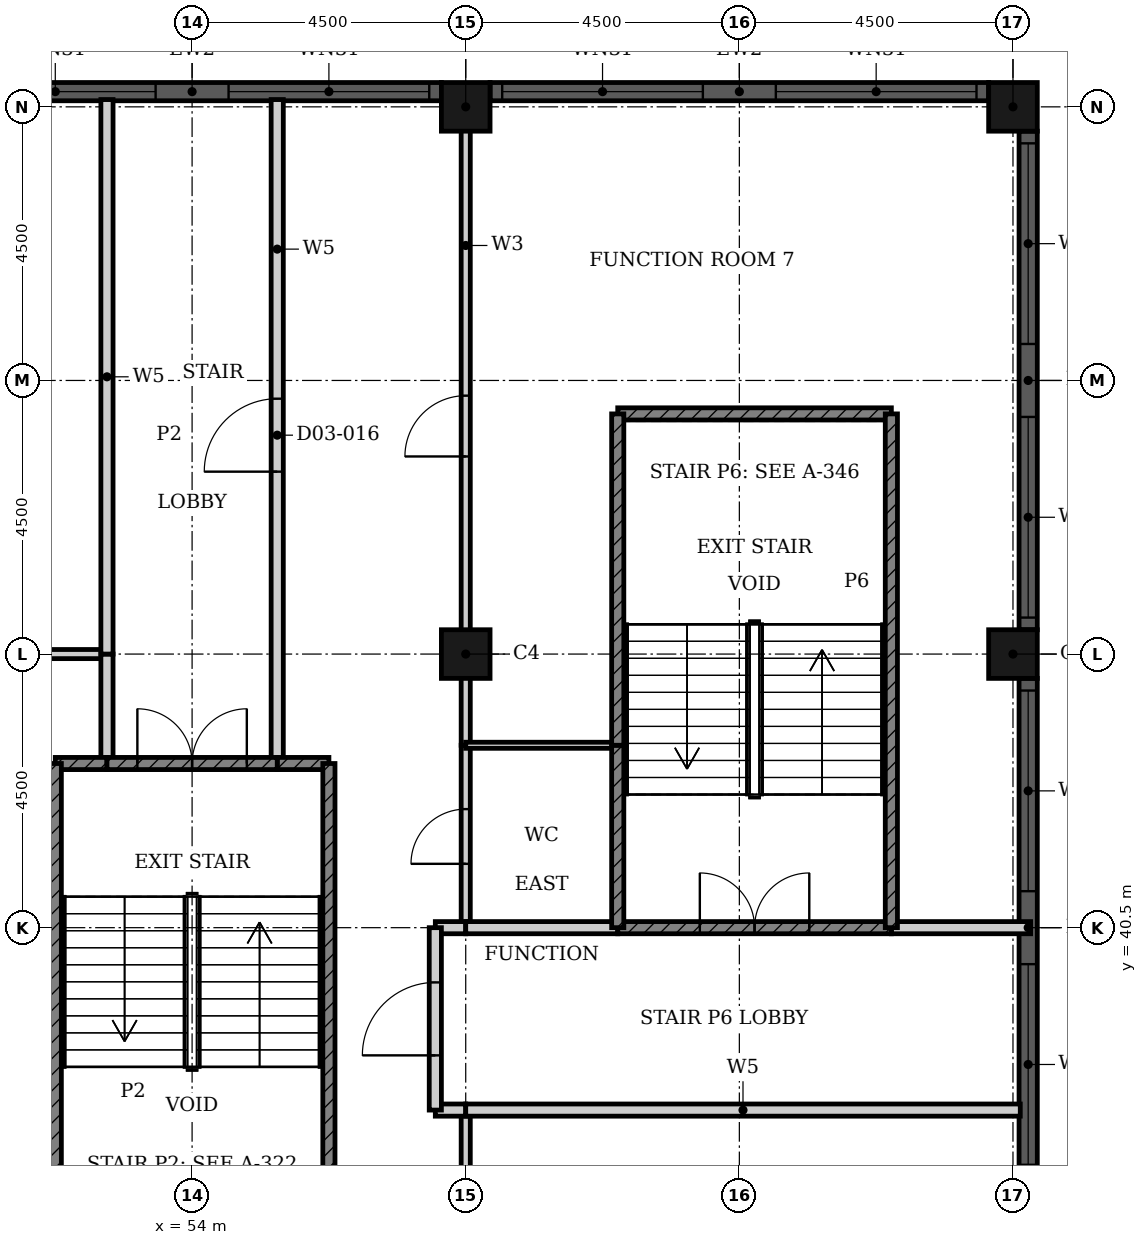
"""IFC4 building model, lengths in metres.
Left out: names, types, materials, properties, quantities, classifications, styles, units other than length and angle.
Written with IfcOpenShell. Run it as: python <this file> out.ifc"""

import sys

from ifc_helpers import new_model, si_unit, direction, frame, frame_2d, origin, origin_2d, place, context, subcontext, project, spatial, rectangle, hollow_rectangle, extrude, element, fill, save


model = new_model("IFC4")
c1 = context("Model", 3, precision=1e-05, world=origin(), true_north=direction((0.0, 1.0)))
c2 = subcontext(c1, "Body", "Model", "MODEL_VIEW")
j1 = project(units=[si_unit("LENGTHUNIT", "METRE"), si_unit("PLANEANGLEUNIT", "RADIAN")], contexts=[c1])
p1 = place(None, origin())
s1 = spatial("IfcSite", under=j1, at=p1, CompositionType="ELEMENT")
p2 = place(p1, origin())
s2 = spatial("IfcBuilding", under=s1, at=p2, CompositionType="ELEMENT")
p3 = place(p2, frame((0.0, 0.0, 17.4)))
s3 = spatial("IfcBuildingStorey", under=s2, at=p3, CompositionType="ELEMENT", Elevation=17.4)
for number, where, z_axis, x_axis in (
    (1, (58.5, 54.0, 0.0), (0.0, 0.0, 1.0), (1.0, 0.0, 0.0)),
    (2, (67.5, 45.0, 0.0), (0.0, 0.0, 1.0), (1.0, 0.0, 0.0)),
    (3, (67.5, 54.0, 0.0), (0.0, 0.0, 1.0), (1.0, 0.0, 0.0)),
    (4, (58.5, 45.0, 0.0), (0.0, 0.0, 1.0), (1.0, 0.0, 0.0)),
):
    element("IfcColumn", number, at=place(p3, frame(where, z_axis=z_axis, x_axis=x_axis)), inside=s3, PredefinedType="COLUMN", context=c2, shape_type="SweptSolid", body=[
        extrude(hollow_rectangle(XDim=0.8, YDim=0.8, WallThickness=0.025, at=origin_2d()), origin(), (0.0, 0.0, 1.0), 6.6),
    ])
p4 = place(p3, frame((67.75, 36.4, 0.0), z_axis=(0.0, 0.0, 1.0), x_axis=(0.0, 1.0, 0.0)))
e5 = element("IfcWall", 5, at=p4, inside=s3, PredefinedType="SOLIDWALL", context=c2, shape_type="SweptSolid", body=[
    extrude(rectangle(XDim=8.2, YDim=0.3, at=frame_2d((4.1, 0.0))), origin(), (0.0, 0.0, 1.0), 6.6),
])
p5 = place(p4, frame((0.2, 0.0, 0.9)))
e6 = element("IfcOpeningElement", 6, at=p5, cuts=e5, PredefinedType="OPENING", context=c2, shape_type="SweptSolid", body=[
    extrude(rectangle(XDim=3.3, YDim=3.6, at=frame_2d((1.65, 1.8))), frame((0.0, 0.16, 0.0), z_axis=(0.0, -1.0, 0.0), x_axis=(1.0, 0.0, 0.0)), (0.0, 0.0, 1.0), 0.32),
])
p6 = place(p4, frame((4.7, 0.0, 0.9)))
e7 = element("IfcOpeningElement", 7, at=p6, cuts=e5, PredefinedType="OPENING", context=c2, shape_type="SweptSolid", body=[
    extrude(rectangle(XDim=3.3, YDim=3.6, at=frame_2d((1.65, 1.8))), frame((0.0, 0.16, 0.0), z_axis=(0.0, -1.0, 0.0), x_axis=(1.0, 0.0, 0.0)), (0.0, 0.0, 1.0), 0.32),
])
p7 = place(p3, frame((67.75, 45.4, 0.0), z_axis=(0.0, 0.0, 1.0), x_axis=(0.0, 1.0, 0.0)))
e8 = element("IfcWall", 8, at=p7, inside=s3, PredefinedType="SOLIDWALL", context=c2, shape_type="SweptSolid", body=[
    extrude(rectangle(XDim=8.2, YDim=0.3, at=frame_2d((4.1, 0.0))), origin(), (0.0, 0.0, 1.0), 6.6),
])
p8 = place(p7, frame((0.2, 0.0, 0.9)))
e9 = element("IfcOpeningElement", 9, at=p8, cuts=e8, PredefinedType="OPENING", context=c2, shape_type="SweptSolid", body=[
    extrude(rectangle(XDim=3.3, YDim=3.6, at=frame_2d((1.65, 1.8))), frame((0.0, 0.16, 0.0), z_axis=(0.0, -1.0, 0.0), x_axis=(1.0, 0.0, 0.0)), (0.0, 0.0, 1.0), 0.32),
])
p9 = place(p7, frame((4.7, 0.0, 0.9)))
e10 = element("IfcOpeningElement", 10, at=p9, cuts=e8, PredefinedType="OPENING", context=c2, shape_type="SweptSolid", body=[
    extrude(rectangle(XDim=3.3, YDim=3.6, at=frame_2d((1.65, 1.8))), frame((0.0, 0.16, 0.0), z_axis=(0.0, -1.0, 0.0), x_axis=(1.0, 0.0, 0.0)), (0.0, 0.0, 1.0), 0.32),
])
p10 = place(p3, frame((67.1, 54.25, 0.0), z_axis=(0.0, 0.0, 1.0), x_axis=(-1.0, 0.0, 0.0)))
e11 = element("IfcWall", 11, at=p10, inside=s3, PredefinedType="SOLIDWALL", context=c2, shape_type="SweptSolid", body=[
    extrude(rectangle(XDim=8.2, YDim=0.3, at=frame_2d((4.1, 0.0))), origin(), (0.0, 0.0, 1.0), 6.6),
])
p11 = place(p10, frame((0.2, 0.0, 0.9)))
e12 = element("IfcOpeningElement", 12, at=p11, cuts=e11, PredefinedType="OPENING", context=c2, shape_type="SweptSolid", body=[
    extrude(rectangle(XDim=3.3, YDim=3.6, at=frame_2d((1.65, 1.8))), frame((0.0, 0.16, 0.0), z_axis=(0.0, -1.0, 0.0), x_axis=(1.0, 0.0, 0.0)), (0.0, 0.0, 1.0), 0.32),
])
p12 = place(p10, frame((4.7, 0.0, 0.9)))
e13 = element("IfcOpeningElement", 13, at=p12, cuts=e11, PredefinedType="OPENING", context=c2, shape_type="SweptSolid", body=[
    extrude(rectangle(XDim=3.3, YDim=3.6, at=frame_2d((1.65, 1.8))), frame((0.0, 0.16, 0.0), z_axis=(0.0, -1.0, 0.0), x_axis=(1.0, 0.0, 0.0)), (0.0, 0.0, 1.0), 0.32),
])
p13 = place(p3, frame((58.1, 54.25, 0.0), z_axis=(0.0, 0.0, 1.0), x_axis=(-1.0, 0.0, 0.0)))
e14 = element("IfcWall", 14, at=p13, inside=s3, PredefinedType="SOLIDWALL", context=c2, shape_type="SweptSolid", body=[
    extrude(rectangle(XDim=8.2, YDim=0.3, at=frame_2d((4.1, 0.0))), origin(), (0.0, 0.0, 1.0), 6.6),
])
p14 = place(p13, frame((0.2, 0.0, 0.9)))
e15 = element("IfcOpeningElement", 15, at=p14, cuts=e14, PredefinedType="OPENING", context=c2, shape_type="SweptSolid", body=[
    extrude(rectangle(XDim=3.3, YDim=3.6, at=frame_2d((1.65, 1.8))), frame((0.0, 0.16, 0.0), z_axis=(0.0, -1.0, 0.0), x_axis=(1.0, 0.0, 0.0)), (0.0, 0.0, 1.0), 0.32),
])
p15 = place(p13, frame((4.7, 0.0, 0.9)))
e16 = element("IfcOpeningElement", 16, at=p15, cuts=e14, PredefinedType="OPENING", context=c2, shape_type="SweptSolid", body=[
    extrude(rectangle(XDim=3.3, YDim=3.6, at=frame_2d((1.65, 1.8))), frame((0.0, 0.16, 0.0), z_axis=(0.0, -1.0, 0.0), x_axis=(1.0, 0.0, 0.0)), (0.0, 0.0, 1.0), 0.32),
])
p16 = place(p3, frame((45.5, 45.0, 0.0), z_axis=(0.0, 0.0, 1.0), x_axis=(1.0, 0.0, 0.0)))
e17 = element("IfcWall", 17, at=p16, inside=s3, PredefinedType="PARTITIONING", context=c2, shape_type="SweptSolid", body=[
    extrude(rectangle(XDim=7.1, YDim=0.15, at=frame_2d((3.55, 0.0))), origin(), (0.0, 0.0, 1.0), 6.25),
])
p17 = place(p16, frame((2.15, 0.0, 0.0)))
e18 = element("IfcOpeningElement", 18, at=p17, cuts=e17, PredefinedType="OPENING", context=c2, shape_type="SweptSolid", body=[
    extrude(rectangle(XDim=1.0, YDim=2.1, at=frame_2d((0.5, 1.05))), frame((0.0, 0.085, 0.0), z_axis=(0.0, -1.0, 0.0), x_axis=(1.0, 0.0, 0.0)), (0.0, 0.0, 1.0), 0.17),
])
p18 = place(p3, frame((58.5, 30.75, 0.0), z_axis=(0.0, 0.0, 1.0), x_axis=(0.0, 1.0, 0.0)))
e19 = element("IfcWall", 19, at=p18, inside=s3, PredefinedType="PARTITIONING", context=c2, shape_type="SweptSolid", body=[
    extrude(rectangle(XDim=6.75, YDim=0.15, at=frame_2d((3.375, 0.0))), origin(), (0.0, 0.0, 1.0), 6.25),
])
p19 = place(p18, frame((1.075, 0.0, 0.0)))
e20 = element("IfcOpeningElement", 20, at=p19, cuts=e19, PredefinedType="OPENING", context=c2, shape_type="SweptSolid", body=[
    extrude(rectangle(XDim=1.0, YDim=2.1, at=frame_2d((0.5, 1.05))), frame((0.0, 0.085, 0.0), z_axis=(0.0, -1.0, 0.0), x_axis=(1.0, 0.0, 0.0)), (0.0, 0.0, 1.0), 0.17),
])
p20 = place(p3, frame((58.5, 40.5, 0.0), z_axis=(0.0, 0.0, 1.0), x_axis=(0.0, 1.0, 0.0)))
e21 = element("IfcWall", 21, at=p20, inside=s3, PredefinedType="PARTITIONING", context=c2, shape_type="SweptSolid", body=[
    extrude(rectangle(XDim=3.0, YDim=0.15, at=frame_2d((1.5, 0.0))), origin(), (0.0, 0.0, 1.0), 6.25),
])
p21 = place(p20, frame((1.05, 0.0, 0.0)))
e22 = element("IfcOpeningElement", 22, at=p21, cuts=e21, PredefinedType="OPENING", context=c2, shape_type="SweptSolid", body=[
    extrude(rectangle(XDim=0.9, YDim=2.1, at=frame_2d((0.45, 1.05))), frame((0.0, 0.085, 0.0), z_axis=(0.0, -1.0, 0.0), x_axis=(1.0, 0.0, 0.0)), (0.0, 0.0, 1.0), 0.17),
])
p22 = place(p3, frame((58.5, 43.5, 0.0), z_axis=(0.0, 0.0, 1.0), x_axis=(0.0, 1.0, 0.0)))
e23 = element("IfcWall", 23, at=p22, inside=s3, PredefinedType="PARTITIONING", context=c2, shape_type="SweptSolid", body=[
    extrude(rectangle(XDim=10.69, YDim=0.15, at=frame_2d((5.345, 0.0))), origin(), (0.0, 0.0, 1.0), 6.25),
])
p23 = place(p22, frame((4.75, 0.0, 0.0)))
e24 = element("IfcOpeningElement", 24, at=p23, cuts=e23, PredefinedType="OPENING", context=c2, shape_type="SweptSolid", body=[
    extrude(rectangle(XDim=1.0, YDim=2.1, at=frame_2d((0.5, 1.05))), frame((0.0, 0.085, 0.0), z_axis=(0.0, -1.0, 0.0), x_axis=(1.0, 0.0, 0.0)), (0.0, 0.0, 1.0), 0.17),
])
p24 = place(p3, frame((58.5, 43.5, 0.0), z_axis=(0.0, 0.0, 1.0), x_axis=(1.0, 0.0, 0.0)))
e25 = element("IfcWall", 25, at=p24, inside=s3, PredefinedType="PARTITIONING", context=c2, shape_type="SweptSolid", body=[
    extrude(rectangle(XDim=2.5, YDim=0.1, at=frame_2d((1.25, 0.0))), origin(), (0.0, 0.0, 1.0), 6.25),
])
p25 = place(p3, frame((58.0, 37.5, 0.0), z_axis=(0.0, 0.0, 1.0), x_axis=(1.0, 0.0, 0.0)))
e26 = element("IfcWall", 26, at=p25, inside=s3, PredefinedType="PARTITIONING", context=c2, shape_type="SweptSolid", body=[
    extrude(rectangle(XDim=0.5, YDim=0.2, at=frame_2d((0.25, 0.0))), origin(), (0.0, 0.0, 1.0), 6.25),
])
p26 = place(p3, frame((58.5, 37.5, 0.0), z_axis=(0.0, 0.0, 1.0), x_axis=(1.0, 0.0, 0.0)))
e27 = element("IfcWall", 27, at=p26, inside=s3, PredefinedType="PARTITIONING", context=c2, shape_type="SweptSolid", body=[
    extrude(rectangle(XDim=9.12, YDim=0.2, at=frame_2d((4.56, 0.0))), origin(), (0.0, 0.0, 1.0), 6.25),
])
p27 = place(p3, frame((58.0, 40.5, 0.0), z_axis=(0.0, 0.0, 1.0), x_axis=(1.0, 0.0, 0.0)))
e28 = element("IfcWall", 28, at=p27, inside=s3, PredefinedType="PARTITIONING", context=c2, shape_type="SweptSolid", body=[
    extrude(rectangle(XDim=0.5, YDim=0.2, at=frame_2d((0.25, 0.0))), origin(), (0.0, 0.0, 1.0), 6.25),
])
p28 = place(p3, frame((58.5, 40.5, 0.0), z_axis=(0.0, 0.0, 1.0), x_axis=(1.0, 0.0, 0.0)))
e29 = element("IfcWall", 29, at=p28, inside=s3, PredefinedType="PARTITIONING", context=c2, shape_type="SweptSolid", body=[
    extrude(rectangle(XDim=2.5, YDim=0.2, at=frame_2d((1.25, 0.0))), origin(), (0.0, 0.0, 1.0), 6.25),
])
p29 = place(p3, frame((65.5, 40.5, 0.0), z_axis=(0.0, 0.0, 1.0), x_axis=(1.0, 0.0, 0.0)))
e30 = element("IfcWall", 30, at=p29, inside=s3, PredefinedType="PARTITIONING", context=c2, shape_type="SweptSolid", body=[
    extrude(rectangle(XDim=2.29, YDim=0.2, at=frame_2d((1.145, 0.0))), origin(), (0.0, 0.0, 1.0), 6.25),
])
p30 = place(p3, frame((52.6, 43.2, 0.0), z_axis=(0.0, 0.0, 1.0), x_axis=(0.0, 1.0, 0.0)))
e31 = element("IfcWall", 31, at=p30, inside=s3, PredefinedType="PARTITIONING", context=c2, shape_type="SweptSolid", body=[
    extrude(rectangle(XDim=1.8, YDim=0.2, at=frame_2d((0.9, 0.0))), origin(), (0.0, 0.0, 1.0), 6.25),
])
p31 = place(p3, frame((52.6, 45.0, 0.0), z_axis=(0.0, 0.0, 1.0), x_axis=(0.0, 1.0, 0.0)))
e32 = element("IfcWall", 32, at=p31, inside=s3, PredefinedType="PARTITIONING", context=c2, shape_type="SweptSolid", body=[
    extrude(rectangle(XDim=9.12, YDim=0.2, at=frame_2d((4.56, 0.0))), origin(), (0.0, 0.0, 1.0), 6.25),
])
p32 = place(p3, frame((55.4, 43.2, 0.0), z_axis=(0.0, 0.0, 1.0), x_axis=(0.0, 1.0, 0.0)))
e33 = element("IfcWall", 33, at=p32, inside=s3, PredefinedType="PARTITIONING", context=c2, shape_type="SweptSolid", body=[
    extrude(rectangle(XDim=10.92, YDim=0.2, at=frame_2d((5.46, 0.0))), origin(), (0.0, 0.0, 1.0), 6.25),
])
p33 = place(p32, frame((4.8, 0.0, 0.0)))
e34 = element("IfcOpeningElement", 34, at=p33, cuts=e33, PredefinedType="OPENING", context=c2, shape_type="SweptSolid", body=[
    extrude(rectangle(XDim=1.2, YDim=2.1, at=frame_2d((0.6, 1.05))), frame((0.0, 0.11, 0.0), z_axis=(0.0, -1.0, 0.0), x_axis=(1.0, 0.0, 0.0)), (0.0, 0.0, 1.0), 0.22),
])
p34 = place(p3, frame((58.0, 37.5, 0.0), z_axis=(0.0, 0.0, 1.0), x_axis=(0.0, 1.0, 0.0)))
e35 = element("IfcWall", 35, at=p34, inside=s3, PredefinedType="PARTITIONING", context=c2, shape_type="SweptSolid", body=[
    extrude(rectangle(XDim=3.0, YDim=0.2, at=frame_2d((1.5, 0.0))), origin(), (0.0, 0.0, 1.0), 6.25),
])
p35 = place(p34, frame((0.9, 0.0, 0.0)))
e36 = element("IfcOpeningElement", 36, at=p35, cuts=e35, PredefinedType="OPENING", context=c2, shape_type="SweptSolid", body=[
    extrude(rectangle(XDim=1.2, YDim=2.1, at=frame_2d((0.6, 1.05))), frame((0.0, 0.11, 0.0), z_axis=(0.0, -1.0, 0.0), x_axis=(1.0, 0.0, 0.0)), (0.0, 0.0, 1.0), 0.22),
])
p36 = place(p3, frame((61.0, 40.5, 0.0), z_axis=(0.0, 0.0, 1.0), x_axis=(1.0, 0.0, 0.0)))
e37 = element("IfcWall", 37, at=p36, inside=s3, PredefinedType="SHEAR", context=c2, shape_type="SweptSolid", body=[
    extrude(rectangle(XDim=4.5, YDim=0.2, at=frame_2d((2.25, 0.0))), origin(), (0.0, 0.0, 1.0), 6.25),
])
p37 = place(p36, frame((1.35, 0.0, 0.0)))
e38 = element("IfcOpeningElement", 38, at=p37, cuts=e37, PredefinedType="OPENING", context=c2, shape_type="SweptSolid", body=[
    extrude(rectangle(XDim=1.8, YDim=2.1, at=frame_2d((0.9, 1.05))), frame((0.0, 0.11, 0.0), z_axis=(0.0, -1.0, 0.0), x_axis=(1.0, 0.0, 0.0)), (0.0, 0.0, 1.0), 0.22),
])
for number, where, z_axis, x_axis in (
    (39, (51.75, 43.2, 0.0), (0.0, 0.0, 1.0), (1.0, 0.0, 0.0)),
    (40, (55.4, 43.2, 0.0), (0.0, 0.0, 1.0), (1.0, 0.0, 0.0)),
):
    element("IfcWall", number, at=place(p3, frame(where, z_axis=z_axis, x_axis=x_axis)), inside=s3, PredefinedType="SHEAR", context=c2, shape_type="SweptSolid", body=[
        extrude(rectangle(XDim=0.85, YDim=0.2, at=frame_2d((0.425, 0.0))), origin(), (0.0, 0.0, 1.0), 6.25),
    ])
p38 = place(p3, frame((52.6, 43.2, 0.0), z_axis=(0.0, 0.0, 1.0), x_axis=(1.0, 0.0, 0.0)))
e41 = element("IfcWall", 41, at=p38, inside=s3, PredefinedType="SHEAR", context=c2, shape_type="SweptSolid", body=[
    extrude(rectangle(XDim=2.8, YDim=0.2, at=frame_2d((1.4, 0.0))), origin(), (0.0, 0.0, 1.0), 6.25),
])
p39 = place(p38, frame((0.5, 0.0, 0.0)))
e42 = element("IfcOpeningElement", 42, at=p39, cuts=e41, PredefinedType="OPENING", context=c2, shape_type="SweptSolid", body=[
    extrude(rectangle(XDim=1.8, YDim=2.1, at=frame_2d((0.9, 1.05))), frame((0.0, 0.11, 0.0), z_axis=(0.0, -1.0, 0.0), x_axis=(1.0, 0.0, 0.0)), (0.0, 0.0, 1.0), 0.22),
])
p40 = place(p3, frame((61.0, 48.95, 0.0), z_axis=(0.0, 0.0, 1.0), x_axis=(1.0, 0.0, 0.0)))
e43 = element("IfcWall", 43, at=p40, inside=s3, PredefinedType="SHEAR", context=c2, shape_type="SweptSolid", body=[
    extrude(rectangle(XDim=4.5, YDim=0.2, at=frame_2d((2.25, 0.0))), origin(), (0.0, 0.0, 1.0), 6.25),
])
for number, where, z_axis, x_axis in (
    (44, (51.75, 34.75, 0.0), (0.0, 0.0, 1.0), (0.0, 1.0, 0.0)),
    (45, (56.25, 34.75, 0.0), (0.0, 0.0, 1.0), (0.0, 1.0, 0.0)),
):
    element("IfcWall", number, at=place(p3, frame(where, z_axis=z_axis, x_axis=x_axis)), inside=s3, PredefinedType="SHEAR", context=c2, shape_type="SweptSolid", body=[
        extrude(rectangle(XDim=8.45, YDim=0.2, at=frame_2d((4.225, 0.0))), origin(), (0.0, 0.0, 1.0), 6.25),
    ])
p41 = place(p3, frame((61.0, 40.5, 0.0), z_axis=(0.0, 0.0, 1.0), x_axis=(0.0, 1.0, 0.0)))
e46 = element("IfcWall", 46, at=p41, inside=s3, PredefinedType="SHEAR", context=c2, shape_type="SweptSolid", body=[
    extrude(rectangle(XDim=3.0, YDim=0.2, at=frame_2d((1.5, 0.0))), origin(), (0.0, 0.0, 1.0), 6.25),
])
p42 = place(p3, frame((61.0, 43.5, 0.0), z_axis=(0.0, 0.0, 1.0), x_axis=(0.0, 1.0, 0.0)))
e47 = element("IfcWall", 47, at=p42, inside=s3, PredefinedType="SHEAR", context=c2, shape_type="SweptSolid", body=[
    extrude(rectangle(XDim=5.45, YDim=0.2, at=frame_2d((2.725, 0.0))), origin(), (0.0, 0.0, 1.0), 6.25),
])
p43 = place(p3, frame((65.5, 40.5, 0.0), z_axis=(0.0, 0.0, 1.0), x_axis=(0.0, 1.0, 0.0)))
e48 = element("IfcWall", 48, at=p43, inside=s3, PredefinedType="SHEAR", context=c2, shape_type="SweptSolid", body=[
    extrude(rectangle(XDim=8.45, YDim=0.2, at=frame_2d((4.225, 0.0))), origin(), (0.0, 0.0, 1.0), 6.25),
])
p44 = place(p5, origin())
e49 = element("IfcWindow", 49, at=p44, inside=s3, PartitioningType="SINGLE_PANEL", PredefinedType="WINDOW", context=c2, shape_type="SweptSolid", body=[
    extrude(rectangle(XDim=3.3, YDim=3.6, at=frame_2d((1.65, 1.8))), frame((0.0, 0.03, 0.0), z_axis=(0.0, -1.0, 0.0), x_axis=(1.0, 0.0, 0.0)), (0.0, 0.0, 1.0), 0.06),
])
fill(e6, e49)
p45 = place(p6, origin())
e50 = element("IfcWindow", 50, at=p45, inside=s3, PartitioningType="SINGLE_PANEL", PredefinedType="WINDOW", context=c2, shape_type="SweptSolid", body=[
    extrude(rectangle(XDim=3.3, YDim=3.6, at=frame_2d((1.65, 1.8))), frame((0.0, 0.03, 0.0), z_axis=(0.0, -1.0, 0.0), x_axis=(1.0, 0.0, 0.0)), (0.0, 0.0, 1.0), 0.06),
])
fill(e7, e50)
p46 = place(p8, origin())
e51 = element("IfcWindow", 51, at=p46, inside=s3, PartitioningType="SINGLE_PANEL", PredefinedType="WINDOW", context=c2, shape_type="SweptSolid", body=[
    extrude(rectangle(XDim=3.3, YDim=3.6, at=frame_2d((1.65, 1.8))), frame((0.0, 0.03, 0.0), z_axis=(0.0, -1.0, 0.0), x_axis=(1.0, 0.0, 0.0)), (0.0, 0.0, 1.0), 0.06),
])
fill(e9, e51)
p47 = place(p9, origin())
e52 = element("IfcWindow", 52, at=p47, inside=s3, PartitioningType="SINGLE_PANEL", PredefinedType="WINDOW", context=c2, shape_type="SweptSolid", body=[
    extrude(rectangle(XDim=3.3, YDim=3.6, at=frame_2d((1.65, 1.8))), frame((0.0, 0.03, 0.0), z_axis=(0.0, -1.0, 0.0), x_axis=(1.0, 0.0, 0.0)), (0.0, 0.0, 1.0), 0.06),
])
fill(e10, e52)
p48 = place(p11, origin())
e53 = element("IfcWindow", 53, at=p48, inside=s3, PartitioningType="SINGLE_PANEL", PredefinedType="WINDOW", context=c2, shape_type="SweptSolid", body=[
    extrude(rectangle(XDim=3.3, YDim=3.6, at=frame_2d((1.65, 1.8))), frame((0.0, 0.03, 0.0), z_axis=(0.0, -1.0, 0.0), x_axis=(1.0, 0.0, 0.0)), (0.0, 0.0, 1.0), 0.06),
])
fill(e12, e53)
p49 = place(p12, origin())
e54 = element("IfcWindow", 54, at=p49, inside=s3, PartitioningType="SINGLE_PANEL", PredefinedType="WINDOW", context=c2, shape_type="SweptSolid", body=[
    extrude(rectangle(XDim=3.3, YDim=3.6, at=frame_2d((1.65, 1.8))), frame((0.0, 0.03, 0.0), z_axis=(0.0, -1.0, 0.0), x_axis=(1.0, 0.0, 0.0)), (0.0, 0.0, 1.0), 0.06),
])
fill(e13, e54)
p50 = place(p14, origin())
e55 = element("IfcWindow", 55, at=p50, inside=s3, PartitioningType="SINGLE_PANEL", PredefinedType="WINDOW", context=c2, shape_type="SweptSolid", body=[
    extrude(rectangle(XDim=3.3, YDim=3.6, at=frame_2d((1.65, 1.8))), frame((0.0, 0.03, 0.0), z_axis=(0.0, -1.0, 0.0), x_axis=(1.0, 0.0, 0.0)), (0.0, 0.0, 1.0), 0.06),
])
fill(e15, e55)
p51 = place(p15, origin())
e56 = element("IfcWindow", 56, at=p51, inside=s3, PartitioningType="SINGLE_PANEL", PredefinedType="WINDOW", context=c2, shape_type="SweptSolid", body=[
    extrude(rectangle(XDim=3.3, YDim=3.6, at=frame_2d((1.65, 1.8))), frame((0.0, 0.03, 0.0), z_axis=(0.0, -1.0, 0.0), x_axis=(1.0, 0.0, 0.0)), (0.0, 0.0, 1.0), 0.06),
])
fill(e16, e56)
p52 = place(p33, origin())
e57 = element("IfcDoor", 57, at=p52, inside=s3, OperationType="SINGLE_SWING_RIGHT", PredefinedType="DOOR", context=c2, shape_type="SweptSolid", body=[
    extrude(rectangle(XDim=1.2, YDim=2.1, at=frame_2d((0.6, 1.05))), frame((0.0, 0.025, 0.0), z_axis=(0.0, -1.0, 0.0), x_axis=(1.0, 0.0, 0.0)), (0.0, 0.0, 1.0), 0.05),
])
fill(e34, e57)
p53 = place(p39, origin())
e58 = element("IfcDoor", 58, at=p53, inside=s3, OperationType="DOUBLE_DOOR_SINGLE_SWING", PredefinedType="DOOR", context=c2, shape_type="SweptSolid", body=[
    extrude(rectangle(XDim=1.8, YDim=2.1, at=frame_2d((0.9, 1.05))), frame((0.0, 0.025, 0.0), z_axis=(0.0, -1.0, 0.0), x_axis=(1.0, 0.0, 0.0)), (0.0, 0.0, 1.0), 0.05),
])
fill(e42, e58)
p54 = place(p35, origin())
e59 = element("IfcDoor", 59, at=p54, inside=s3, OperationType="SINGLE_SWING_LEFT", PredefinedType="DOOR", context=c2, shape_type="SweptSolid", body=[
    extrude(rectangle(XDim=1.2, YDim=2.1, at=frame_2d((0.6, 1.05))), frame((0.0, 0.025, 0.0), z_axis=(0.0, -1.0, 0.0), x_axis=(1.0, 0.0, 0.0)), (0.0, 0.0, 1.0), 0.05),
])
fill(e36, e59)
p55 = place(p37, origin())
e60 = element("IfcDoor", 60, at=p55, inside=s3, OperationType="DOUBLE_DOOR_SINGLE_SWING", PredefinedType="DOOR", context=c2, shape_type="SweptSolid", body=[
    extrude(rectangle(XDim=1.8, YDim=2.1, at=frame_2d((0.9, 1.05))), frame((0.0, 0.025, 0.0), z_axis=(0.0, -1.0, 0.0), x_axis=(1.0, 0.0, 0.0)), (0.0, 0.0, 1.0), 0.05),
])
fill(e38, e60)
p56 = place(p21, origin())
e61 = element("IfcDoor", 61, at=p56, inside=s3, OperationType="SINGLE_SWING_LEFT", PredefinedType="DOOR", context=c2, shape_type="SweptSolid", body=[
    extrude(rectangle(XDim=0.9, YDim=2.1, at=frame_2d((0.45, 1.05))), frame((0.0, 0.025, 0.0), z_axis=(0.0, -1.0, 0.0), x_axis=(1.0, 0.0, 0.0)), (0.0, 0.0, 1.0), 0.05),
])
fill(e22, e61)
p57 = place(p23, origin())
e62 = element("IfcDoor", 62, at=p57, inside=s3, OperationType="SINGLE_SWING_RIGHT", PredefinedType="DOOR", context=c2, shape_type="SweptSolid", body=[
    extrude(rectangle(XDim=1.0, YDim=2.1, at=frame_2d((0.5, 1.05))), frame((0.0, 0.025, 0.0), z_axis=(0.0, -1.0, 0.0), x_axis=(1.0, 0.0, 0.0)), (0.0, 0.0, 1.0), 0.05),
])
fill(e24, e62)
save(model, sys.argv[1])
